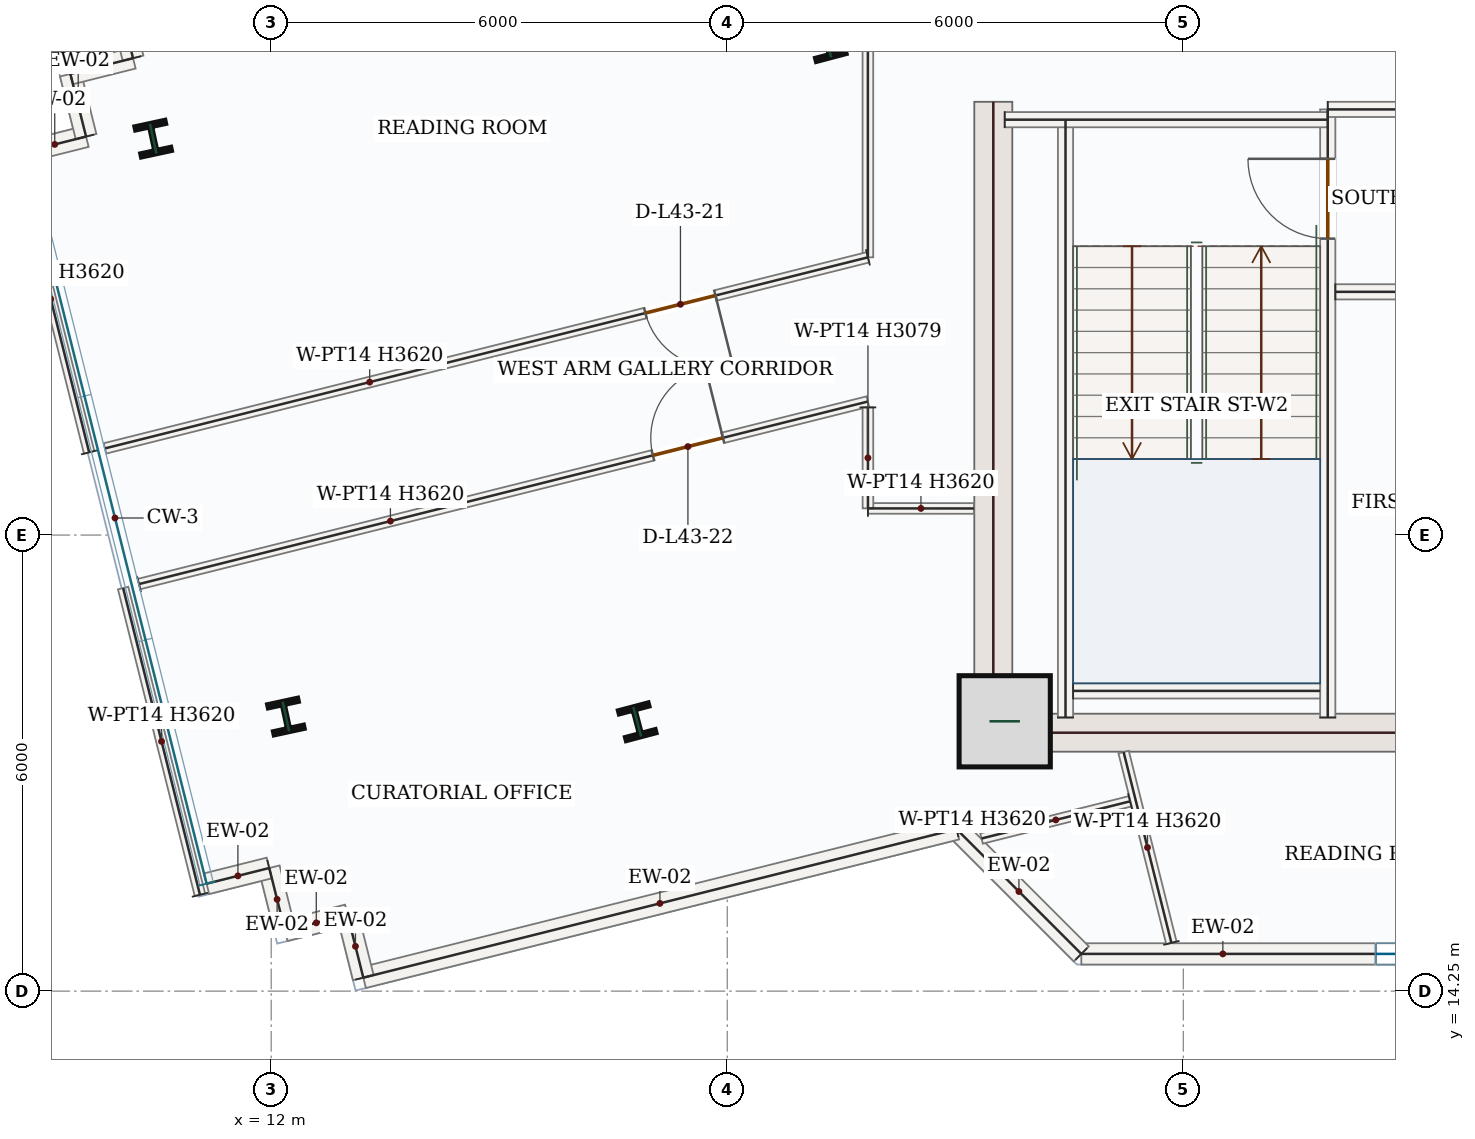
"""IFC4 building model, lengths in metres.
Left out: names, types, materials, properties, quantities, classifications, styles, units other than length and angle.
Written with IfcOpenShell. Run it as: python <this file> out.ifc"""

import sys

from ifc_helpers import new_model, si_unit, direction, frame, frame_2d, origin, origin_2d, place, context, subcontext, project, spatial, rectangle, i_section, extrude, source, transform, mapped, element, fill, save


model = new_model("IFC4")
c1 = context("Model", 3, precision=1e-05, world=origin(), true_north=direction((0.0, 1.0)))
c2 = subcontext(c1, "Body", "Model", "MODEL_VIEW")
j1 = project(units=[si_unit("LENGTHUNIT", "METRE"), si_unit("PLANEANGLEUNIT", "RADIAN")], contexts=[c1])
p1 = place(None, origin())
s1 = spatial("IfcSite", under=j1, at=p1, CompositionType="ELEMENT")
p2 = place(p1, origin())
s2 = spatial("IfcBuilding", under=s1, at=p2, CompositionType="ELEMENT")
p3 = place(p2, frame((0.0, 0.0, 186.3)))
s3 = spatial("IfcBuildingStorey", under=s2, at=p3, CompositionType="ELEMENT", Elevation=186.3)
m1 = source(origin(), c2, "Body", "SweptSolid", [
    extrude(rectangle(XDim=8.55, YDim=0.5, at=frame_2d((4.275, 0.0))), origin(), (0.0, 0.0, 1.0), 3.62),
])
p4 = place(p3, frame((21.5, 17.4, 0.0), z_axis=(0.0, 0.0, 1.0), x_axis=(0.0, 1.0, 0.0)))
e1 = element("IfcWall", 1, at=p4, inside=s3, PredefinedType="SHEAR", context=c2, shape_type="MappedRepresentation", body=[
    mapped(m1, transform((0.0, 0.0, 0.0), x_axis=(1.0, 0.0, 0.0), y_axis=(0.0, 1.0, 0.0), z_axis=(0.0, 0.0, 1.0), scale=1.0)),
])
m2 = source(origin(), c2, "Body", "SweptSolid", [
    extrude(rectangle(XDim=7.0, YDim=0.5, at=frame_2d((3.5, 0.0))), origin(), (0.0, 0.0, 1.0), 3.62),
])
p5 = place(p3, frame((21.75, 17.65, 0.0), z_axis=(0.0, 0.0, 1.0), x_axis=(1.0, 0.0, 0.0)))
e2 = element("IfcWall", 2, at=p5, inside=s3, PredefinedType="SHEAR", context=c2, shape_type="MappedRepresentation", body=[
    mapped(m2, transform((0.0, 0.0, 0.0), x_axis=(1.0, 0.0, 0.0), y_axis=(0.0, 1.0, 0.0), z_axis=(0.0, 0.0, 1.0), scale=1.0)),
])
m3 = source(origin(), c2, "Body", "SweptSolid", [
    extrude(rectangle(XDim=1.2, YDim=1.2, at=origin_2d()), origin(), (0.0, 0.0, 1.0), 3.9),
])
p6 = place(p3, frame((21.65, 17.8, 0.0), z_axis=(0.0, 0.0, 1.0), x_axis=(1.0, 0.0, 0.0)))
e3 = element("IfcColumn", 3, at=p6, inside=s3, PredefinedType="COLUMN", context=c2, shape_type="MappedRepresentation", body=[
    mapped(m3, transform((0.0, 0.0, 0.0), x_axis=(1.0, 0.0, 0.0), y_axis=(0.0, 1.0, 0.0), z_axis=(0.0, 0.0, 1.0), scale=1.0)),
])
m4 = source(origin(), c2, "Body", "SweptSolid", [
    extrude(i_section(OverallWidth=0.404, OverallDepth=0.407, WebThickness=0.027, FlangeThickness=0.044, FilletRadius=0.018, at=origin_2d()), origin(), (0.0, 0.0, 1.0), 3.9),
])
for number, where, z_axis, x_axis in (
    (4, (19.316, 26.729, 0.0), (0.0, 0.0, 1.0), (0.967, 0.255, 0.0)),
    (5, (16.815, 17.794, 0.0), (0.0, 0.0, 1.0), (0.967, 0.255, 0.0)),
    (6, (10.447, 25.465, 0.0), (0.0, 0.0, 1.0), (0.977, 0.211, 0.0)),
    (7, (12.193, 17.863, 0.0), (0.0, 0.0, 1.0), (0.977, 0.211, 0.0)),
):
    element("IfcColumn", number, at=place(p3, frame(where, z_axis=z_axis, x_axis=x_axis)), inside=s3, PredefinedType="COLUMN", context=c2, shape_type="MappedRepresentation", body=[
        mapped(m4, transform((0.0, 0.0, 0.0), x_axis=(1.0, 0.0, 0.0), y_axis=(0.0, 1.0, 0.0), z_axis=(0.0, 0.0, 1.0), scale=1.0)),
    ])
p7 = place(p3, frame((32.205, 14.74, 0.0), z_axis=(0.0, 0.0, 1.0), x_axis=(-1.0, 0.0, 0.0)))
e8 = element("IfcWall", 8, at=p7, inside=s3, PredefinedType="SOLIDWALL", context=c2, shape_type="SweptSolid", body=[
    extrude(rectangle(XDim=9.547, YDim=0.28, at=frame_2d((4.773, 0.0))), origin(), (0.0, 0.0, 1.0), 3.62),
])
p8 = place(p7, frame((3.873, 0.0, 0.85)))
e9 = element("IfcOpeningElement", 9, at=p8, cuts=e8, PredefinedType="OPENING", context=c2, shape_type="SweptSolid", body=[
    extrude(rectangle(XDim=1.8, YDim=1.75, at=frame_2d((0.9, 0.875))), frame((0.0, 0.15, 0.0), z_axis=(0.0, -1.0, 0.0), x_axis=(1.0, 0.0, 0.0)), (0.0, 0.0, 1.0), 0.3),
])
m5 = source(origin(), c2, "Body", "SweptSolid", [
    extrude(rectangle(XDim=2.322, YDim=0.28, at=frame_2d((1.161, 0.0))), origin(), (0.0, 0.0, 1.0), 3.62),
])
p9 = place(p3, frame((22.658, 14.74, 0.0), z_axis=(0.0, 0.0, 1.0), x_axis=(-0.707106781187, 0.707106781187, 0.0)))
e10 = element("IfcWall", 10, at=p9, inside=s3, PredefinedType="SOLIDWALL", context=c2, shape_type="MappedRepresentation", body=[
    mapped(m5, transform((0.0, 0.0, 0.0), x_axis=(1.0, 0.0, 0.0), y_axis=(0.0, 1.0, 0.0), z_axis=(0.0, 0.0, 1.0), scale=1.0)),
])
m6 = source(origin(), c2, "Body", "SweptSolid", [
    extrude(rectangle(XDim=8.045, YDim=0.28, at=frame_2d((4.023, 0.0))), origin(), (0.0, 0.0, 1.0), 3.62),
])
p10 = place(p3, frame((21.016, 16.382, 0.0), z_axis=(0.0, 0.0, 1.0), x_axis=(-0.970040669564, -0.242942584557, 0.0)))
e11 = element("IfcWall", 11, at=p10, inside=s3, PredefinedType="SOLIDWALL", context=c2, shape_type="MappedRepresentation", body=[
    mapped(m6, transform((0.0, 0.0, 0.0), x_axis=(1.0, 0.0, 0.0), y_axis=(0.0, 1.0, 0.0), z_axis=(0.0, 0.0, 1.0), scale=1.0)),
])
m7 = source(origin(), c2, "Body", "SweptSolid", [
    extrude(rectangle(XDim=0.85, YDim=0.28, at=frame_2d((0.425, 0.0))), origin(), (0.0, 0.0, 1.0), 3.62),
])
for number, where, z_axis, x_axis in (
    (12, (13.212, 14.427, 0.0), (0.0, 0.0, 1.0), (-0.243, 0.97, 0.0)),
    (13, (13.005, 15.252, 0.0), (0.0, 0.0, 1.0), (-0.97, -0.243, 0.0)),
):
    element("IfcWall", number, at=place(p3, frame(where, z_axis=z_axis, x_axis=x_axis)), inside=s3, PredefinedType="SOLIDWALL", context=c2, shape_type="MappedRepresentation", body=[
        mapped(m7, transform((0.0, 0.0, 0.0), x_axis=(1.0, 0.0, 0.0), y_axis=(0.0, 1.0, 0.0), z_axis=(0.0, 0.0, 1.0), scale=1.0)),
    ])
m8 = source(origin(), c2, "Body", "SweptSolid", [
    extrude(rectangle(XDim=0.85, YDim=0.28, at=frame_2d((0.425, 0.0))), origin(), (0.0, 0.0, 1.0), 3.62),
])
p11 = place(p3, frame((12.181, 15.045, 0.0), z_axis=(0.0, 0.0, 1.0), x_axis=(-0.242941012307, 0.970041063326, 0.0)))
e14 = element("IfcWall", 14, at=p11, inside=s3, PredefinedType="SOLIDWALL", context=c2, shape_type="MappedRepresentation", body=[
    mapped(m8, transform((0.0, 0.0, 0.0), x_axis=(1.0, 0.0, 0.0), y_axis=(0.0, 1.0, 0.0), z_axis=(0.0, 0.0, 1.0), scale=1.0)),
])
for number, where, z_axis, x_axis in (
    (15, (11.974, 15.87, 0.0), (0.0, 0.0, 1.0), (-0.97, -0.243, 0.0)),
    (16, (8.74, 25.286, 0.0), (0.0, 0.0, 1.0), (0.97, 0.243, 0.0)),
    (17, (9.564, 25.493, 0.0), (0.0, 0.0, 1.0), (-0.243, 0.97, 0.0)),
):
    element("IfcWall", number, at=place(p3, frame(where, z_axis=z_axis, x_axis=x_axis)), inside=s3, PredefinedType="SOLIDWALL", context=c2, shape_type="MappedRepresentation", body=[
        mapped(m7, transform((0.0, 0.0, 0.0), x_axis=(1.0, 0.0, 0.0), y_axis=(0.0, 1.0, 0.0), z_axis=(0.0, 0.0, 1.0), scale=1.0)),
    ])
p12 = place(p3, frame((9.358, 26.317, 0.0), z_axis=(0.0, 0.0, 1.0), x_axis=(0.970041063326, 0.242941012307, 0.0)))
e18 = element("IfcWall", 18, at=p12, inside=s3, PredefinedType="SOLIDWALL", context=c2, shape_type="MappedRepresentation", body=[
    mapped(m8, transform((0.0, 0.0, 0.0), x_axis=(1.0, 0.0, 0.0), y_axis=(0.0, 1.0, 0.0), z_axis=(0.0, 0.0, 1.0), scale=1.0)),
])
p13 = place(p3, frame((10.182, 26.524, 0.0), z_axis=(0.0, 0.0, 1.0), x_axis=(-0.243008704507, 0.970024107708, 0.0)))
e19 = element("IfcWall", 19, at=p13, inside=s3, PredefinedType="SOLIDWALL", context=c2, shape_type="MappedRepresentation", body=[
    mapped(m7, transform((0.0, 0.0, 0.0), x_axis=(1.0, 0.0, 0.0), y_axis=(0.0, 1.0, 0.0), z_axis=(0.0, 0.0, 1.0), scale=1.0)),
])
m9 = source(origin(), c2, "Body", "SweptSolid", [
    extrude(rectangle(XDim=7.87, YDim=0.2, at=frame_2d((3.935, 0.0))), origin(), (0.0, 0.0, 1.0), 3.62),
])
p14 = place(p3, frame((22.45, 17.85, 0.0), z_axis=(0.0, 0.0, 1.0), x_axis=(0.0, 1.0, 0.0)))
e20 = element("IfcWall", 20, at=p14, inside=s3, PredefinedType="SOLIDWALL", context=c2, shape_type="MappedRepresentation", body=[
    mapped(m9, transform((0.0, 0.0, 0.0), x_axis=(1.0, 0.0, 0.0), y_axis=(0.0, 1.0, 0.0), z_axis=(0.0, 0.0, 1.0), scale=1.0)),
])
p15 = place(p3, frame((25.9, 17.85, 0.0), z_axis=(0.0, 0.0, 1.0), x_axis=(0.0, 1.0, 0.0)))
e21 = element("IfcWall", 21, at=p15, inside=s3, PredefinedType="SOLIDWALL", context=c2, shape_type="SweptSolid", body=[
    extrude(rectangle(XDim=8.0, YDim=0.2, at=frame_2d((4.0, 0.0))), origin(), (0.0, 0.0, 1.0), 3.62),
])
p16 = place(p15, frame((6.3, 0.0, 0.0)))
e22 = element("IfcOpeningElement", 22, at=p16, cuts=e21, PredefinedType="OPENING", context=c2, shape_type="SweptSolid", body=[
    extrude(rectangle(XDim=1.05, YDim=2.15, at=frame_2d((0.525, 1.075))), frame((0.0, 0.11, 0.0), z_axis=(0.0, -1.0, 0.0), x_axis=(1.0, 0.0, 0.0)), (0.0, 0.0, 1.0), 0.22),
])
m10 = source(origin(), c2, "Body", "SweptSolid", [
    extrude(rectangle(XDim=4.25, YDim=0.2, at=frame_2d((2.125, 0.0))), origin(), (0.0, 0.0, 1.0), 3.62),
])
p17 = place(p3, frame((21.65, 25.715, 0.0), z_axis=(0.0, 0.0, 1.0), x_axis=(1.0, 0.0, 0.0)))
e23 = element("IfcWall", 23, at=p17, inside=s3, PredefinedType="SOLIDWALL", context=c2, shape_type="MappedRepresentation", body=[
    mapped(m10, transform((0.0, 0.0, 0.0), x_axis=(1.0, 0.0, 0.0), y_axis=(0.0, 1.0, 0.0), z_axis=(0.0, 0.0, 1.0), scale=1.0)),
])
m11 = source(origin(), c2, "Body", "SweptSolid", [
    extrude(rectangle(XDim=3.0, YDim=0.2, at=frame_2d((1.5, 0.0))), origin(), (0.0, 0.0, 1.0), 3.62),
])
p18 = place(p3, frame((25.9, 25.85, 0.0), z_axis=(0.0, 0.0, 1.0), x_axis=(1.0, 0.0, 0.0)))
e24 = element("IfcWall", 24, at=p18, inside=s3, PredefinedType="SOLIDWALL", context=c2, shape_type="MappedRepresentation", body=[
    mapped(m11, transform((0.0, 0.0, 0.0), x_axis=(1.0, 0.0, 0.0), y_axis=(0.0, 1.0, 0.0), z_axis=(0.0, 0.0, 1.0), scale=1.0)),
])
m12 = source(origin(), c2, "Body", "SweptSolid", [
    extrude(rectangle(XDim=3.25, YDim=0.2, at=frame_2d((1.625, 0.0))), origin(), (0.0, 0.0, 1.0), 3.62),
])
p19 = place(p3, frame((22.55, 18.2, 0.0), z_axis=(0.0, 0.0, 1.0), x_axis=(1.0, 0.0, 0.0)))
e25 = element("IfcWall", 25, at=p19, inside=s3, PredefinedType="SOLIDWALL", context=c2, shape_type="MappedRepresentation", body=[
    mapped(m12, transform((0.0, 0.0, 0.0), x_axis=(1.0, 0.0, 0.0), y_axis=(0.0, 1.0, 0.0), z_axis=(0.0, 0.0, 1.0), scale=1.0)),
])
m13 = source(origin(), c2, "Body", "SweptSolid", [
    extrude(rectangle(XDim=2.75, YDim=0.2, at=frame_2d((1.375, 0.0))), origin(), (0.0, 0.0, 1.0), 3.62),
])
p20 = place(p3, frame((26.0, 23.45, 0.0), z_axis=(0.0, 0.0, 1.0), x_axis=(1.0, 0.0, 0.0)))
e26 = element("IfcWall", 26, at=p20, inside=s3, PredefinedType="SOLIDWALL", context=c2, shape_type="MappedRepresentation", body=[
    mapped(m13, transform((0.0, 0.0, 0.0), x_axis=(1.0, 0.0, 0.0), y_axis=(0.0, 1.0, 0.0), z_axis=(0.0, 0.0, 1.0), scale=1.0)),
])
m14 = source(origin(), c2, "Body", "SweptSolid", [
    extrude(rectangle(XDim=2.588, YDim=0.14, at=frame_2d((1.294, 0.0))), origin(), (0.0, 0.0, 1.0), 3.62),
])
p21 = place(p3, frame((23.843, 14.885, 0.0), z_axis=(0.0, 0.0, 1.0), x_axis=(-0.242957412811, 0.97003695577, 0.0)))
e27 = element("IfcWall", 27, at=p21, inside=s3, PredefinedType="PARTITIONING", context=c2, shape_type="MappedRepresentation", body=[
    mapped(m14, transform((0.0, 0.0, 0.0), x_axis=(1.0, 0.0, 0.0), y_axis=(0.0, 1.0, 0.0), z_axis=(0.0, 0.0, 1.0), scale=1.0)),
])
m15 = source(origin(), c2, "Body", "SweptSolid", [
    extrude(rectangle(XDim=1.394, YDim=0.14, at=frame_2d((0.697, 0.0))), origin(), (0.0, 0.0, 1.0), 3.62),
])
p22 = place(p3, frame((19.851, 20.601, 0.0), z_axis=(0.0, 0.0, 1.0), x_axis=(0.999999754632, -0.000700525222, 0.0)))
e28 = element("IfcWall", 28, at=p22, inside=s3, PredefinedType="PARTITIONING", context=c2, shape_type="MappedRepresentation", body=[
    mapped(m15, transform((0.0, 0.0, 0.0), x_axis=(1.0, 0.0, 0.0), y_axis=(0.0, 1.0, 0.0), z_axis=(0.0, 0.0, 1.0), scale=1.0)),
])
m16 = source(origin(), c2, "Body", "SweptSolid", [
    extrude(rectangle(XDim=2.014, YDim=0.14, at=frame_2d((1.007, 0.0))), origin(), (0.0, 0.0, 1.0), 3.62),
])
p23 = place(p3, frame((23.299, 16.747, 0.0), z_axis=(0.0, 0.0, 1.0), x_axis=(-0.970056889313, -0.242877811867, 0.0)))
e29 = element("IfcWall", 29, at=p23, inside=s3, PredefinedType="PARTITIONING", context=c2, shape_type="MappedRepresentation", body=[
    mapped(m16, transform((0.0, 0.0, 0.0), x_axis=(1.0, 0.0, 0.0), y_axis=(0.0, 1.0, 0.0), z_axis=(0.0, 0.0, 1.0), scale=1.0)),
])
m17 = source(origin(), c2, "Body", "SweptSolid", [
    extrude(rectangle(XDim=4.16, YDim=0.14, at=frame_2d((2.08, 0.0))), origin(), (0.0, 0.0, 1.0), 3.62),
])
p24 = place(p3, frame((11.062, 15.518, 0.0), z_axis=(0.0, 0.0, 1.0), x_axis=(-0.242963670411, 0.970035388458, 0.0)))
e30 = element("IfcWall", 30, at=p24, inside=s3, PredefinedType="PARTITIONING", context=c2, shape_type="MappedRepresentation", body=[
    mapped(m17, transform((0.0, 0.0, 0.0), x_axis=(1.0, 0.0, 0.0), y_axis=(0.0, 1.0, 0.0), z_axis=(0.0, 0.0, 1.0), scale=1.0)),
])
p25 = place(p3, frame((10.26, 19.605, 0.0), z_axis=(0.0, 0.0, 1.0), x_axis=(0.970042179759, 0.242936554451, 0.0)))
e31 = element("IfcWall", 31, at=p25, inside=s3, PredefinedType="PARTITIONING", context=c2, shape_type="SweptSolid", body=[
    extrude(rectangle(XDim=9.886, YDim=0.14, at=frame_2d((4.943, 0.0))), origin(), (0.0, 0.0, 1.0), 3.62),
])
p26 = place(p25, frame((6.97, 0.0, 0.0)))
e32 = element("IfcOpeningElement", 32, at=p26, cuts=e31, PredefinedType="OPENING", context=c2, shape_type="SweptSolid", body=[
    extrude(rectangle(XDim=0.95, YDim=2.15, at=frame_2d((0.475, 1.075))), frame((0.0, 0.08, 0.0), z_axis=(0.0, -1.0, 0.0), x_axis=(1.0, 0.0, 0.0)), (0.0, 0.0, 1.0), 0.16),
])
m18 = source(origin(), c2, "Body", "SweptSolid", [
    extrude(rectangle(XDim=1.329, YDim=0.14, at=frame_2d((0.664, 0.0))), origin(), (0.0, 0.0, 1.0), 3.079),
])
p27 = place(p3, frame((19.85, 21.93, 0.0), z_axis=(0.0, 0.0, 1.0), x_axis=(0.00073502369, -0.99999972987, 0.0)))
e33 = element("IfcWall", 33, at=p27, inside=s3, PredefinedType="PARTITIONING", context=c2, shape_type="MappedRepresentation", body=[
    mapped(m18, transform((0.0, 0.0, 0.0), x_axis=(1.0, 0.0, 0.0), y_axis=(0.0, 1.0, 0.0), z_axis=(0.0, 0.0, 1.0), scale=1.0)),
])
p28 = place(p3, frame((9.605, 21.338, 0.0), z_axis=(0.0, 0.0, 1.0), x_axis=(-0.242963670411, 0.970035388458, 0.0)))
e34 = element("IfcWall", 34, at=p28, inside=s3, PredefinedType="PARTITIONING", context=c2, shape_type="MappedRepresentation", body=[
    mapped(m17, transform((0.0, 0.0, 0.0), x_axis=(1.0, 0.0, 0.0), y_axis=(0.0, 1.0, 0.0), z_axis=(0.0, 0.0, 1.0), scale=1.0)),
])
m19 = source(origin(), c2, "Body", "SweptSolid", [
    extrude(rectangle(XDim=6.046, YDim=0.14, at=frame_2d((3.023, 0.0))), origin(), (0.0, 0.0, 1.0), 2.693),
])
p29 = place(p3, frame((19.85, 29.95, 0.0), z_axis=(0.0, 0.0, 1.0), x_axis=(0.0, -1.0, 0.0)))
e35 = element("IfcWall", 35, at=p29, inside=s3, PredefinedType="PARTITIONING", context=c2, shape_type="MappedRepresentation", body=[
    mapped(m19, transform((0.0, 0.0, 0.0), x_axis=(1.0, 0.0, 0.0), y_axis=(0.0, 1.0, 0.0), z_axis=(0.0, 0.0, 1.0), scale=1.0)),
])
p30 = place(p3, frame((19.85, 23.904, 0.0), z_axis=(0.0, 0.0, 1.0), x_axis=(-0.97004665335, -0.24291869077, 0.0)))
e36 = element("IfcWall", 36, at=p30, inside=s3, PredefinedType="PARTITIONING", context=c2, shape_type="SweptSolid", body=[
    extrude(rectangle(XDim=10.347, YDim=0.14, at=frame_2d((5.173, 0.0))), origin(), (0.0, 0.0, 1.0), 3.62),
])
p31 = place(p30, frame((2.067, 0.0, 0.0)))
e37 = element("IfcOpeningElement", 37, at=p31, cuts=e36, PredefinedType="OPENING", context=c2, shape_type="SweptSolid", body=[
    extrude(rectangle(XDim=0.95, YDim=2.15, at=frame_2d((0.475, 1.075))), frame((0.0, 0.08, 0.0), z_axis=(0.0, -1.0, 0.0), x_axis=(1.0, 0.0, 0.0)), (0.0, 0.0, 1.0), 0.16),
])
m20 = source(origin(), c2, "Body", "SweptSolid", [
    extrude(rectangle(XDim=1.8, YDim=1.75, at=frame_2d((0.9, 0.875))), frame((0.0, 0.03, 0.0), z_axis=(0.0, -1.0, 0.0), x_axis=(1.0, 0.0, 0.0)), (0.0, 0.0, 1.0), 0.06),
])
p32 = place(p8, origin())
e38 = element("IfcWindow", 38, at=p32, inside=s3, PartitioningType="DOUBLE_PANEL_VERTICAL", PredefinedType="WINDOW", context=c2, shape_type="MappedRepresentation", body=[
    mapped(m20, transform((0.0, 0.0, 0.0), x_axis=(1.0, 0.0, 0.0), y_axis=(0.0, 1.0, 0.0), z_axis=(0.0, 0.0, 1.0), scale=1.0)),
])
fill(e9, e38)
m21 = source(origin(), c2, "Body", "SweptSolid", [
    extrude(rectangle(XDim=1.05, YDim=2.15, at=frame_2d((0.525, 1.075))), frame((0.0, 0.025, 0.0), z_axis=(0.0, -1.0, 0.0), x_axis=(1.0, 0.0, 0.0)), (0.0, 0.0, 1.0), 0.05),
])
p33 = place(p16, origin())
e39 = element("IfcDoor", 39, at=p33, inside=s3, OperationType="SINGLE_SWING_RIGHT", PredefinedType="DOOR", context=c2, shape_type="MappedRepresentation", body=[
    mapped(m21, transform((0.0, 0.0, 0.0), x_axis=(1.0, 0.0, 0.0), y_axis=(0.0, 1.0, 0.0), z_axis=(0.0, 0.0, 1.0), scale=1.0)),
])
fill(e22, e39)
m22 = source(origin(), c2, "Body", "SweptSolid", [
    extrude(rectangle(XDim=0.95, YDim=2.15, at=frame_2d((0.475, 1.075))), frame((0.0, 0.025, 0.0), z_axis=(0.0, -1.0, 0.0), x_axis=(1.0, 0.0, 0.0)), (0.0, 0.0, 1.0), 0.05),
])
p34 = place(p31, origin())
e40 = element("IfcDoor", 40, at=p34, inside=s3, OperationType="SINGLE_SWING_LEFT", PredefinedType="DOOR", context=c2, shape_type="MappedRepresentation", body=[
    mapped(m22, transform((0.0, 0.0, 0.0), x_axis=(1.0, 0.0, 0.0), y_axis=(0.0, 1.0, 0.0), z_axis=(0.0, 0.0, 1.0), scale=1.0)),
])
fill(e37, e40)
p35 = place(p26, origin())
e41 = element("IfcDoor", 41, at=p35, inside=s3, OperationType="SINGLE_SWING_RIGHT", PredefinedType="DOOR", context=c2, shape_type="MappedRepresentation", body=[
    mapped(m22, transform((0.0, 0.0, 0.0), x_axis=(1.0, 0.0, 0.0), y_axis=(0.0, 1.0, 0.0), z_axis=(0.0, 0.0, 1.0), scale=1.0)),
])
fill(e32, e41)
save(model, sys.argv[1])
